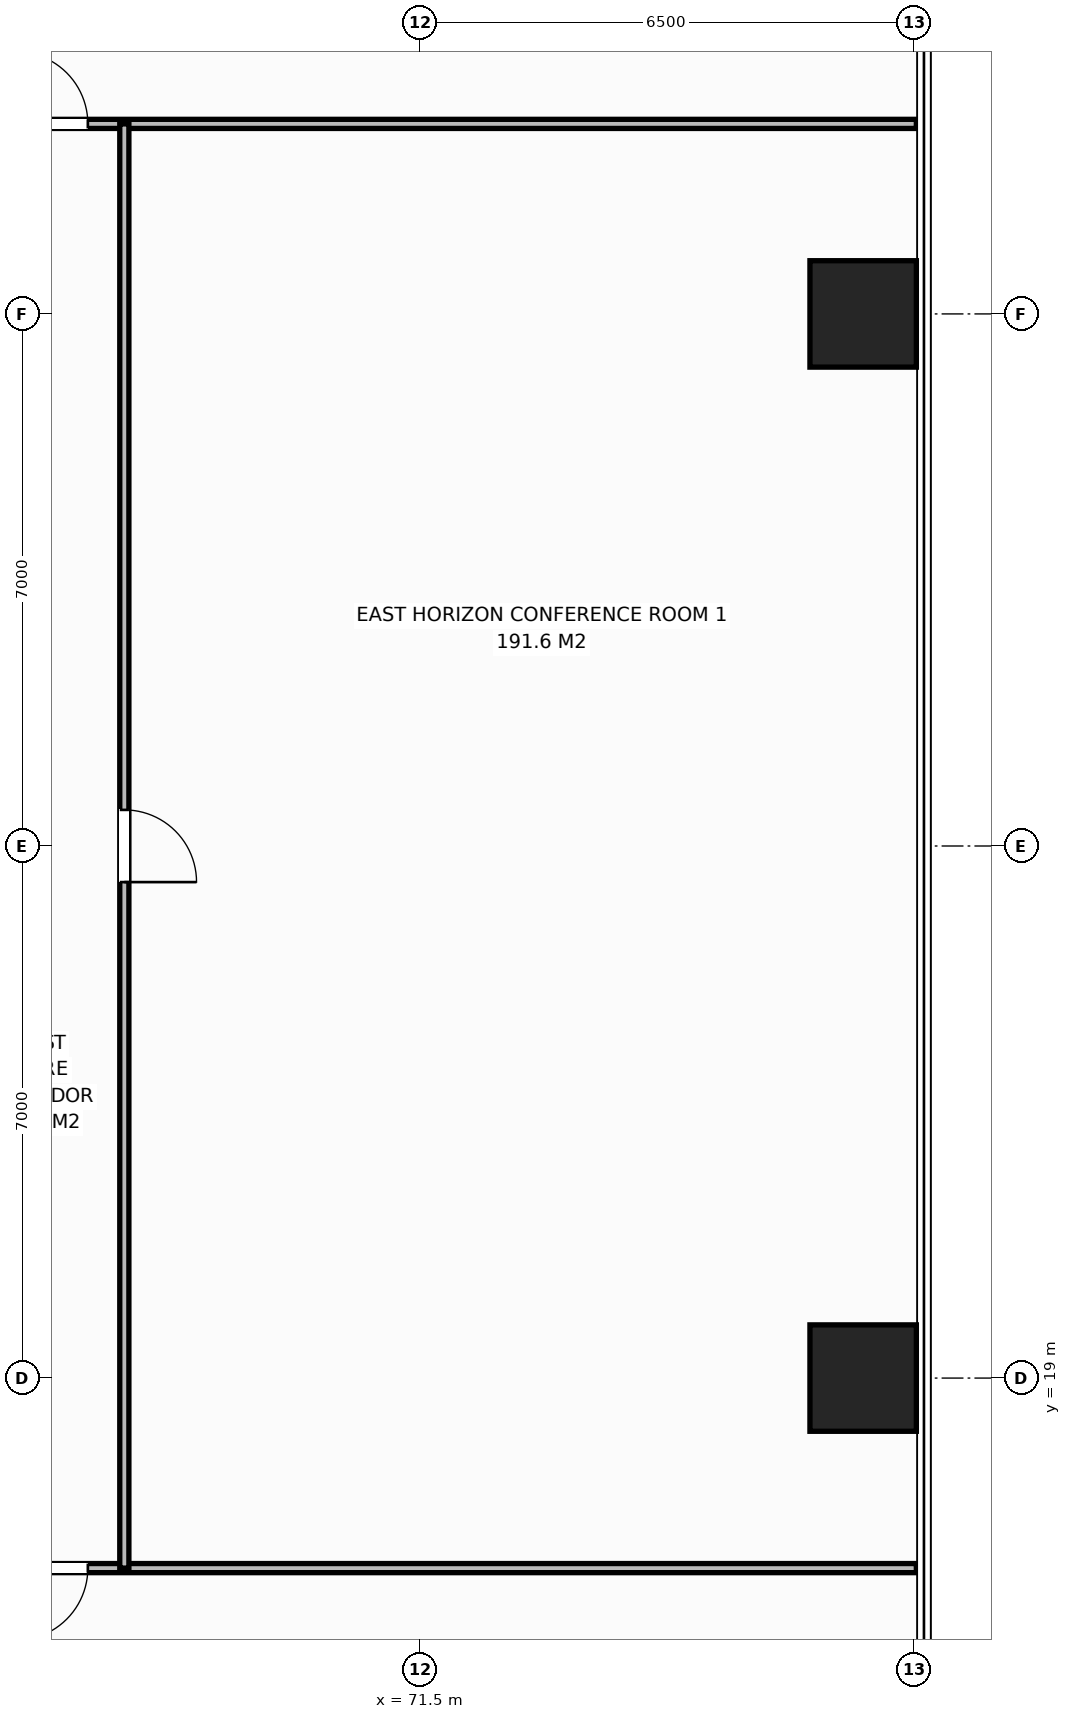
"""IFC4 building model, lengths in metres.
Left out: names, types, materials, properties, quantities, classifications, styles, units other than length and angle.
Written with IfcOpenShell. Run it as: python <this file> out.ifc"""

import sys

from ifc_helpers import new_model, si_unit, direction, frame, frame_2d, origin, origin_2d, place, context, subcontext, project, spatial, rectangle, extrude, element, fill, save


model = new_model("IFC4")
c1 = context("Model", 3, precision=1e-05, world=origin(), true_north=direction((0.0, 1.0)))
c2 = subcontext(c1, "Body", "Model", "MODEL_VIEW")
j1 = project(units=[si_unit("LENGTHUNIT", "METRE"), si_unit("PLANEANGLEUNIT", "RADIAN")], contexts=[c1])
p1 = place(None, origin())
s1 = spatial("IfcSite", under=j1, at=p1, CompositionType="ELEMENT")
p2 = place(p1, origin())
s2 = spatial("IfcBuilding", under=s1, at=p2, CompositionType="ELEMENT")
p3 = place(p2, frame((0.0, 0.0, 58.2)))
s3 = spatial("IfcBuildingStorey", under=s2, at=p3, CompositionType="ELEMENT", Elevation=58.2)
for number, where, z_axis, x_axis in (
    (1, (77.32, 19.0, 0.0), (0.0, 0.0, 1.0), (1.0, 0.0, 0.0)),
    (2, (77.32, 33.0, 0.0), (0.0, 0.0, 1.0), (1.0, 0.0, 0.0)),
):
    element("IfcColumn", number, at=place(p3, frame(where, z_axis=z_axis, x_axis=x_axis)), inside=s3, PredefinedType="COLUMN", context=c2, shape_type="SweptSolid", body=[
        extrude(rectangle(XDim=1.4, YDim=1.4, at=origin_2d()), origin(), (0.0, 0.0, 1.0), 3.8),
    ])
p4 = place(p3, frame((64.86, 35.5, 0.0), z_axis=(0.0, 0.0, 1.0), x_axis=(1.0, 0.0, 0.0)))
e3 = element("IfcWall", 3, at=p4, inside=s3, PredefinedType="PARTITIONING", context=c2, shape_type="SweptSolid", body=[
    extrude(rectangle(XDim=13.16, YDim=0.12, at=frame_2d((6.58, 0.0))), origin(), (0.0, 0.0, 1.0), 3.55),
])
p5 = place(p4, frame((1.31, 0.0, 0.0)))
e4 = element("IfcOpeningElement", 4, at=p5, cuts=e3, PredefinedType="OPENING", context=c2, shape_type="SweptSolid", body=[
    extrude(rectangle(XDim=0.95, YDim=2.15, at=frame_2d((0.475, 1.075))), frame((0.0, 0.07, 0.0), z_axis=(0.0, -1.0, 0.0), x_axis=(1.0, 0.0, 0.0)), (0.0, 0.0, 1.0), 0.14),
])
p6 = place(p3, frame((47.465, 16.5, 0.0), z_axis=(0.0, 0.0, 1.0), x_axis=(1.0, 0.0, 0.0)))
e5 = element("IfcWall", 5, at=p6, inside=s3, PredefinedType="PARTITIONING", context=c2, shape_type="SweptSolid", body=[
    extrude(rectangle(XDim=30.555, YDim=0.12, at=frame_2d((15.278, 0.0))), origin(), (0.0, 0.0, 1.0), 3.55),
])
p7 = place(p6, frame((18.705, 0.0, 0.0)))
e6 = element("IfcOpeningElement", 6, at=p7, cuts=e5, PredefinedType="OPENING", context=c2, shape_type="SweptSolid", body=[
    extrude(rectangle(XDim=0.95, YDim=2.15, at=frame_2d((0.475, 1.075))), frame((0.0, 0.07, 0.0), z_axis=(0.0, -1.0, 0.0), x_axis=(1.0, 0.0, 0.0)), (0.0, 0.0, 1.0), 0.14),
])
p8 = place(p3, frame((67.6, 16.5, 0.0), z_axis=(0.0, 0.0, 1.0), x_axis=(0.0, 1.0, 0.0)))
e7 = element("IfcWall", 7, at=p8, inside=s3, PredefinedType="PARTITIONING", context=c2, shape_type="SweptSolid", body=[
    extrude(rectangle(XDim=19.0, YDim=0.12, at=frame_2d((9.5, 0.0))), origin(), (0.0, 0.0, 1.0), 3.55),
])
p9 = place(p8, frame((9.025, 0.0, 0.0)))
e8 = element("IfcOpeningElement", 8, at=p9, cuts=e7, PredefinedType="OPENING", context=c2, shape_type="SweptSolid", body=[
    extrude(rectangle(XDim=0.95, YDim=2.15, at=frame_2d((0.475, 1.075))), frame((0.0, 0.07, 0.0), z_axis=(0.0, -1.0, 0.0), x_axis=(1.0, 0.0, 0.0)), (0.0, 0.0, 1.0), 0.14),
])
p10 = place(p5, origin())
e9 = element("IfcDoor", 9, at=p10, inside=s3, OperationType="SINGLE_SWING_LEFT", PredefinedType="DOOR", context=c2, shape_type="SweptSolid", body=[
    extrude(rectangle(XDim=0.95, YDim=2.15, at=frame_2d((0.475, 1.075))), frame((0.0, 0.025, 0.0), z_axis=(0.0, -1.0, 0.0), x_axis=(1.0, 0.0, 0.0)), (0.0, 0.0, 1.0), 0.05),
])
fill(e4, e9)
p11 = place(p7, origin())
e10 = element("IfcDoor", 10, at=p11, inside=s3, OperationType="SINGLE_SWING_RIGHT", PredefinedType="DOOR", context=c2, shape_type="SweptSolid", body=[
    extrude(rectangle(XDim=0.95, YDim=2.15, at=frame_2d((0.475, 1.075))), frame((0.0, 0.025, 0.0), z_axis=(0.0, -1.0, 0.0), x_axis=(1.0, 0.0, 0.0)), (0.0, 0.0, 1.0), 0.05),
])
fill(e6, e10)
p12 = place(p9, origin())
e11 = element("IfcDoor", 11, at=p12, inside=s3, OperationType="SINGLE_SWING_RIGHT", PredefinedType="DOOR", context=c2, shape_type="SweptSolid", body=[
    extrude(rectangle(XDim=0.95, YDim=2.15, at=frame_2d((0.475, 1.075))), frame((0.0, 0.025, 0.0), z_axis=(0.0, -1.0, 0.0), x_axis=(1.0, 0.0, 0.0)), (0.0, 0.0, 1.0), 0.05),
])
fill(e8, e11)
save(model, sys.argv[1])
